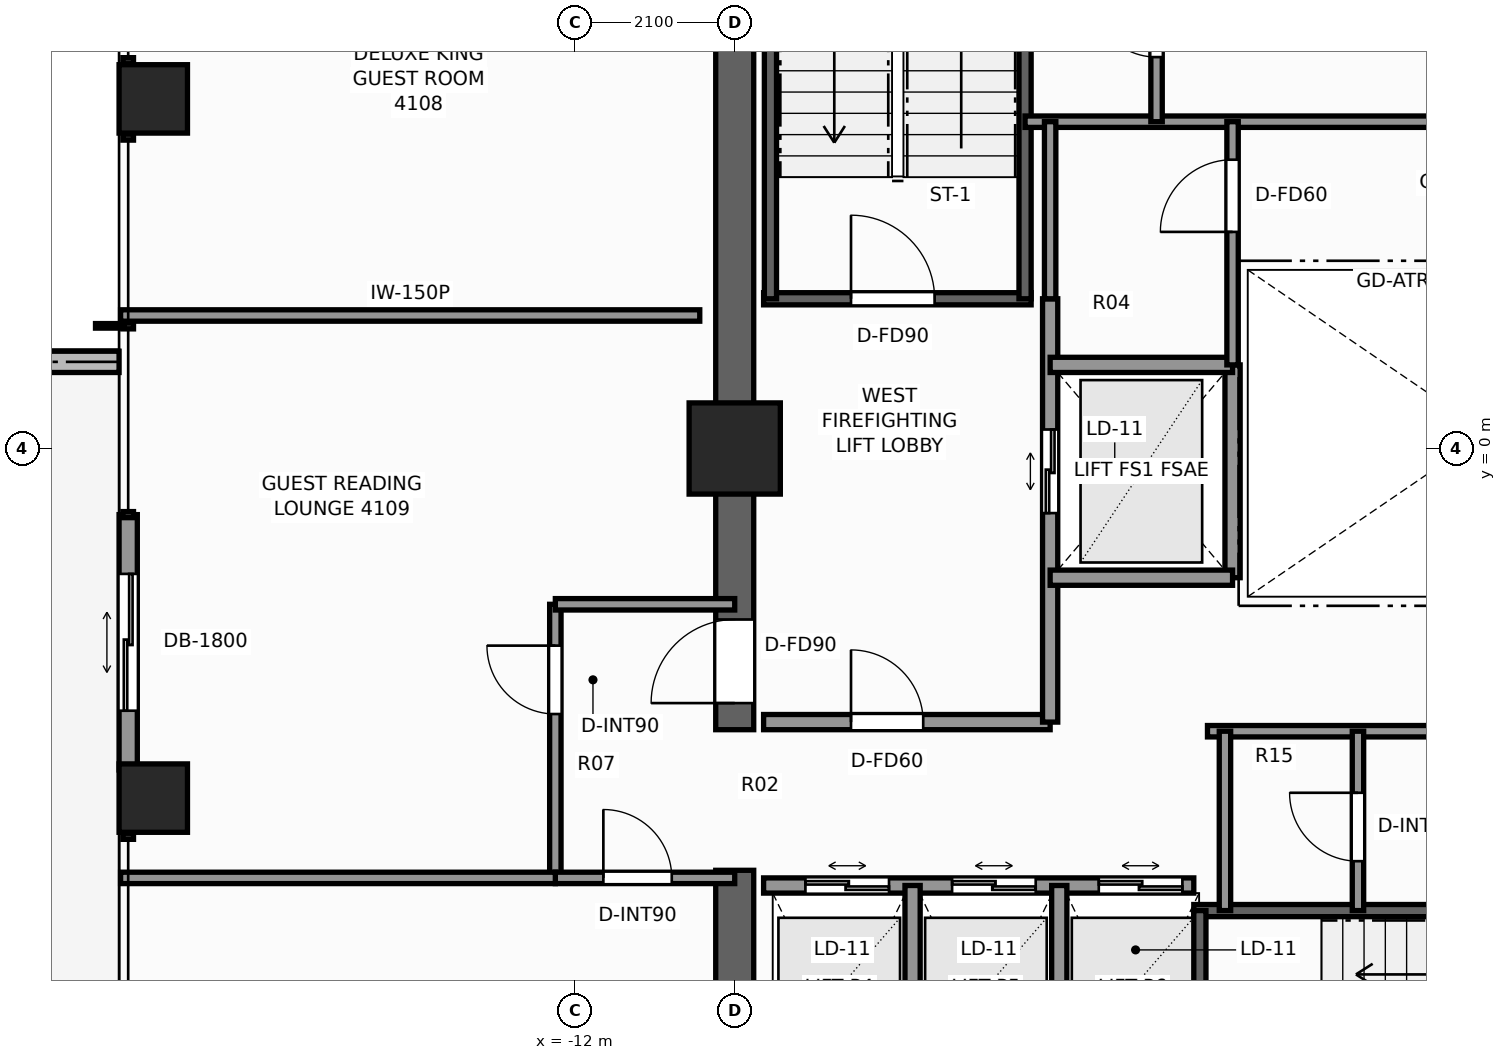
"""IFC4 building model, lengths in metres.
Left out: names, types, materials, properties, quantities, classifications, styles, units other than length and angle.
Written with IfcOpenShell. Run it as: python <this file> out.ifc"""

import sys

from ifc_helpers import new_model, si_unit, direction, frame, frame_2d, origin, origin_2d, place, context, subcontext, project, spatial, rectangle, extrude, element, fill, save


model = new_model("IFC4")
c1 = context("Model", 3, precision=1e-05, world=origin(), true_north=direction((0.0, 1.0)))
c2 = subcontext(c1, "Body", "Model", "MODEL_VIEW")
j1 = project(units=[si_unit("LENGTHUNIT", "METRE"), si_unit("PLANEANGLEUNIT", "RADIAN")], contexts=[c1])
p1 = place(None, origin())
s1 = spatial("IfcSite", under=j1, at=p1, CompositionType="ELEMENT")
p2 = place(p1, origin())
s2 = spatial("IfcBuilding", under=s1, at=p2, CompositionType="ELEMENT")
p3 = place(p2, frame((0.0, 0.0, 141.5)))
s3 = spatial("IfcBuildingStorey", under=s2, at=p3, CompositionType="ELEMENT", Elevation=141.5)
p4 = place(p3, frame((-9.9, -9.65, 0.0), z_axis=(0.0, 0.0, 1.0), x_axis=(0.0, 1.0, 0.0)))
e1 = element("IfcWall", 1, at=p4, inside=s3, PredefinedType="SHEAR", context=c2, shape_type="SweptSolid", body=[
    extrude(rectangle(XDim=4.1, YDim=0.5, at=frame_2d((2.05, 0.0))), origin(), (0.0, 0.0, 1.0), 3.3),
])
p5 = place(p3, frame((-9.9, -3.7, 0.0), z_axis=(0.0, 0.0, 1.0), x_axis=(0.0, 1.0, 0.0)))
e2 = element("IfcWall", 2, at=p5, inside=s3, PredefinedType="SHEAR", context=c2, shape_type="SweptSolid", body=[
    extrude(rectangle(XDim=13.35, YDim=0.5, at=frame_2d((6.675, 0.0))), origin(), (0.0, 0.0, 1.0), 3.3),
])
p6 = place(p5, frame((0.35, 0.0, 0.0)))
e3 = element("IfcOpeningElement", 3, at=p6, cuts=e2, PredefinedType="OPENING", context=c2, shape_type="SweptSolid", body=[
    extrude(rectangle(XDim=1.1, YDim=2.2, at=frame_2d((0.55, 1.1))), frame((0.0, 0.26, 0.0), z_axis=(0.0, -1.0, 0.0), x_axis=(1.0, 0.0, 0.0)), (0.0, 0.0, 1.0), 0.52),
])
p7 = place(p3, frame((-9.9, 0.0, 0.0), z_axis=(0.0, 0.0, 1.0), x_axis=(1.0, 0.0, 0.0)))
e4 = element("IfcColumn", 4, at=p7, inside=s3, PredefinedType="COLUMN", context=c2, shape_type="SweptSolid", body=[
    extrude(rectangle(XDim=1.2, YDim=1.2, at=origin_2d()), origin(), (0.0, 0.0, 1.0), 3.3),
])
for number, where, z_axis, x_axis in (
    (5, (-17.55, -4.6, 0.0), (0.0, 0.0, 1.0), (1.0, 0.0, 0.0)),
    (6, (-17.55, 4.6, 0.0), (0.0, 0.0, 1.0), (1.0, 0.0, 0.0)),
):
    element("IfcColumn", number, at=place(p3, frame(where, z_axis=z_axis, x_axis=x_axis)), inside=s3, PredefinedType="COLUMN", context=c2, shape_type="SweptSolid", body=[
        extrude(rectangle(XDim=0.9, YDim=0.9, at=origin_2d()), origin(), (0.0, 0.0, 1.0), 3.3),
    ])
p8 = place(p3, frame((-18.0, 1.14, -0.02), z_axis=(0.0, 0.0, 1.0), x_axis=(-1.0, 0.0, 0.0)))
e7 = element("IfcWall", 7, at=p8, inside=s3, PredefinedType="PARAPET", context=c2, shape_type="SweptSolid", body=[
    extrude(rectangle(XDim=3.3, YDim=0.28, at=frame_2d((1.65, 0.0))), origin(), (0.0, 0.0, 1.0), 0.42),
])
p9 = place(p3, frame((-17.88, -4.23, 0.0), z_axis=(0.0, 0.0, 1.0), x_axis=(0.0, 1.0, 0.0)))
e8 = element("IfcWall", 8, at=p9, inside=s3, PredefinedType="STANDARD", context=c2, shape_type="SweptSolid", body=[
    extrude(rectangle(XDim=3.36, YDim=0.24, at=frame_2d((1.68, 0.0))), origin(), (0.0, 0.0, 1.0), 3.1),
])
p10 = place(p9, frame((0.78, 0.0, 0.0)))
e9 = element("IfcOpeningElement", 9, at=p10, cuts=e8, PredefinedType="OPENING", context=c2, shape_type="SweptSolid", body=[
    extrude(rectangle(XDim=1.8, YDim=2.2, at=frame_2d((0.9, 1.1))), frame((0.0, 0.13, 0.0), z_axis=(0.0, -1.0, 0.0), x_axis=(1.0, 0.0, 0.0)), (0.0, 0.0, 1.0), 0.26),
])
p11 = place(p3, frame((-9.52, 1.97, 0.0), z_axis=(0.0, 0.0, 1.0), x_axis=(1.0, 0.0, 0.0)))
e10 = element("IfcWall", 10, at=p11, inside=s3, PredefinedType="SHEAR", context=c2, shape_type="SweptSolid", body=[
    extrude(rectangle(XDim=3.52, YDim=0.16, at=frame_2d((1.76, 0.0))), origin(), (0.0, 0.0, 1.0), 3.3),
])
p12 = place(p11, frame((1.15, 0.0, 0.0)))
e11 = element("IfcOpeningElement", 11, at=p12, cuts=e10, PredefinedType="OPENING", context=c2, shape_type="SweptSolid", body=[
    extrude(rectangle(XDim=1.1, YDim=2.2, at=frame_2d((0.55, 1.1))), frame((0.0, 0.09, 0.0), z_axis=(0.0, -1.0, 0.0), x_axis=(1.0, 0.0, 0.0)), (0.0, 0.0, 1.0), 0.18),
])
for number, where, z_axis, x_axis in (
    (12, (-9.43, 1.97, 0.0), (0.0, 0.0, 1.0), (0.0, 1.0, 0.0)),
    (13, (-6.08, 1.97, 0.0), (0.0, 0.0, 1.0), (0.0, 1.0, 0.0)),
):
    element("IfcWall", number, at=place(p3, frame(where, z_axis=z_axis, x_axis=x_axis)), inside=s3, PredefinedType="SHEAR", context=c2, shape_type="SweptSolid", body=[
        extrude(rectangle(XDim=7.56, YDim=0.16, at=frame_2d((3.78, 0.0))), origin(), (0.0, 0.0, 1.0), 3.3),
    ])
p13 = place(p3, frame((-3.86, -6.08, 0.0), z_axis=(0.0, 0.0, 1.0), x_axis=(1.0, 0.0, 0.0)))
e14 = element("IfcWall", 14, at=p13, inside=s3, PredefinedType="SHEAR", context=c2, shape_type="SweptSolid", body=[
    extrude(rectangle(XDim=7.72, YDim=0.16, at=frame_2d((3.86, 0.0))), origin(), (0.0, 0.0, 1.0), 3.3),
])
p14 = place(p3, frame((-3.78, -9.43, 0.0), z_axis=(0.0, 0.0, 1.0), x_axis=(0.0, 1.0, 0.0)))
e15 = element("IfcWall", 15, at=p14, inside=s3, PredefinedType="SHEAR", context=c2, shape_type="SweptSolid", body=[
    extrude(rectangle(XDim=3.35, YDim=0.16, at=frame_2d((1.675, 0.0))), origin(), (0.0, 0.0, 1.0), 3.3),
])
p15 = place(p3, frame((-9.52, -3.6, 0.0), z_axis=(0.0, 0.0, 1.0), x_axis=(1.0, 0.0, 0.0)))
e16 = element("IfcWall", 16, at=p15, inside=s3, PredefinedType="SOLIDWALL", context=c2, shape_type="SweptSolid", body=[
    extrude(rectangle(XDim=3.77, YDim=0.2, at=frame_2d((1.885, 0.0))), origin(), (0.0, 0.0, 1.0), 3.1),
])
p16 = place(p15, frame((1.15, 0.0, 0.0)))
e17 = element("IfcOpeningElement", 17, at=p16, cuts=e16, PredefinedType="OPENING", context=c2, shape_type="SweptSolid", body=[
    extrude(rectangle(XDim=0.95, YDim=2.06, at=frame_2d((0.475, 1.03))), frame((0.0, 0.11, 0.0), z_axis=(0.0, -1.0, 0.0), x_axis=(1.0, 0.0, 0.0)), (0.0, 0.0, 1.0), 0.22),
])
p17 = place(p3, frame((-5.75, -3.6, 0.0), z_axis=(0.0, 0.0, 1.0), x_axis=(0.0, 1.0, 0.0)))
e18 = element("IfcWall", 18, at=p17, inside=s3, PredefinedType="SOLIDWALL", context=c2, shape_type="SweptSolid", body=[
    extrude(rectangle(XDim=5.57, YDim=0.2, at=frame_2d((2.785, 0.0))), origin(), (0.0, 0.0, 1.0), 2.735),
])
p18 = place(p17, frame((2.75, 0.0, 0.0)))
e19 = element("IfcOpeningElement", 19, at=p18, cuts=e18, PredefinedType="OPENING", context=c2, shape_type="SweptSolid", body=[
    extrude(rectangle(XDim=1.1, YDim=2.2, at=frame_2d((0.55, 1.1))), frame((0.0, 0.11, 0.0), z_axis=(0.0, -1.0, 0.0), x_axis=(1.0, 0.0, 0.0)), (0.0, 0.0, 1.0), 0.22),
])
p19 = place(p3, frame((-3.35, -1.7, 0.0), z_axis=(0.0, 0.0, 1.0), x_axis=(0.0, 1.0, 0.0)))
e20 = element("IfcWall", 20, at=p19, inside=s3, PredefinedType="SOLIDWALL", context=c2, shape_type="SweptSolid", body=[
    extrude(rectangle(XDim=2.8, YDim=0.2, at=frame_2d((1.4, 0.0))), origin(), (0.0, 0.0, 1.0), 2.735),
])
for number, where, z_axis, x_axis in (
    (21, (-5.75, -1.7, 0.0), (0.0, 0.0, 1.0), (1.0, 0.0, 0.0)),
    (22, (-5.75, 1.1, 0.0), (0.0, 0.0, 1.0), (1.0, 0.0, 0.0)),
):
    element("IfcWall", number, at=place(p3, frame(where, z_axis=z_axis, x_axis=x_axis)), inside=s3, PredefinedType="SOLIDWALL", context=c2, shape_type="SweptSolid", body=[
        extrude(rectangle(XDim=2.4, YDim=0.2, at=frame_2d((1.2, 0.0))), origin(), (0.0, 0.0, 1.0), 3.1),
    ])
p20 = place(p3, frame((-6.08, 4.3, 0.0), z_axis=(0.0, 0.0, 1.0), x_axis=(1.0, 0.0, 0.0)))
e23 = element("IfcWall", 23, at=p20, inside=s3, PredefinedType="PARTITIONING", context=c2, shape_type="SweptSolid", body=[
    extrude(rectangle(XDim=6.3, YDim=0.15, at=frame_2d((3.15, 0.0))), origin(), (0.0, 0.0, 1.0), 3.1),
])
p21 = place(p3, frame((-4.35, 4.3, 0.0), z_axis=(0.0, 0.0, 1.0), x_axis=(0.0, 1.0, 0.0)))
e24 = element("IfcWall", 24, at=p21, inside=s3, PredefinedType="PARTITIONING", context=c2, shape_type="SweptSolid", body=[
    extrude(rectangle(XDim=5.22, YDim=0.15, at=frame_2d((2.61, 0.0))), origin(), (0.0, 0.0, 1.0), 3.1),
])
p22 = place(p21, frame((0.85, 0.0, 0.0)))
e25 = element("IfcOpeningElement", 25, at=p22, cuts=e24, PredefinedType="OPENING", context=c2, shape_type="SweptSolid", body=[
    extrude(rectangle(XDim=0.85, YDim=2.03, at=frame_2d((0.425, 1.015))), frame((0.0, 0.085, 0.0), z_axis=(0.0, -1.0, 0.0), x_axis=(1.0, 0.0, 0.0)), (0.0, 0.0, 1.0), 0.17),
])
p23 = place(p3, frame((-9.52, -5.75, 0.0), z_axis=(0.0, 0.0, 1.0), x_axis=(1.0, 0.0, 0.0)))
e26 = element("IfcWall", 26, at=p23, inside=s3, PredefinedType="SOLIDWALL", context=c2, shape_type="SweptSolid", body=[
    extrude(rectangle(XDim=5.66, YDim=0.2, at=frame_2d((2.83, 0.0))), origin(), (0.0, 0.0, 1.0), 3.1),
])
p24 = place(p23, frame((0.55, 0.0, 0.0)))
e27 = element("IfcOpeningElement", 27, at=p24, cuts=e26, PredefinedType="OPENING", context=c2, shape_type="SweptSolid", body=[
    extrude(rectangle(XDim=1.1, YDim=2.2, at=frame_2d((0.55, 1.1))), frame((0.0, 0.11, 0.0), z_axis=(0.0, -1.0, 0.0), x_axis=(1.0, 0.0, 0.0)), (0.0, 0.0, 1.0), 0.22),
])
p25 = place(p23, frame((2.48, 0.0, 0.0)))
e28 = element("IfcOpeningElement", 28, at=p25, cuts=e26, PredefinedType="OPENING", context=c2, shape_type="SweptSolid", body=[
    extrude(rectangle(XDim=1.1, YDim=2.2, at=frame_2d((0.55, 1.1))), frame((0.0, 0.11, 0.0), z_axis=(0.0, -1.0, 0.0), x_axis=(1.0, 0.0, 0.0)), (0.0, 0.0, 1.0), 0.22),
])
p26 = place(p23, frame((4.41, 0.0, 0.0)))
e29 = element("IfcOpeningElement", 29, at=p26, cuts=e26, PredefinedType="OPENING", context=c2, shape_type="SweptSolid", body=[
    extrude(rectangle(XDim=1.1, YDim=2.2, at=frame_2d((0.55, 1.1))), frame((0.0, 0.11, 0.0), z_axis=(0.0, -1.0, 0.0), x_axis=(1.0, 0.0, 0.0)), (0.0, 0.0, 1.0), 0.22),
])
for number, where, z_axis, x_axis in (
    (30, (-7.56, -9.52, 0.0), (0.0, 0.0, 1.0), (0.0, 1.0, 0.0)),
    (31, (-5.63, -9.52, 0.0), (0.0, 0.0, 1.0), (0.0, 1.0, 0.0)),
):
    element("IfcWall", number, at=place(p3, frame(where, z_axis=z_axis, x_axis=x_axis)), inside=s3, PredefinedType="SOLIDWALL", context=c2, shape_type="SweptSolid", body=[
        extrude(rectangle(XDim=3.77, YDim=0.2, at=frame_2d((1.885, 0.0))), origin(), (0.0, 0.0, 1.0), 3.1),
    ])
p27 = place(p3, frame((-3.68, -3.72, 0.0), z_axis=(0.0, 0.0, 1.0), x_axis=(1.0, 0.0, 0.0)))
e32 = element("IfcWall", 32, at=p27, inside=s3, PredefinedType="PARTITIONING", context=c2, shape_type="SweptSolid", body=[
    extrude(rectangle(XDim=7.36, YDim=0.15, at=frame_2d((3.68, 0.0))), origin(), (0.0, 0.0, 1.0), 3.1),
])
p28 = place(p3, frame((-3.45, -6.08, 0.0), z_axis=(0.0, 0.0, 1.0), x_axis=(0.0, 1.0, 0.0)))
e33 = element("IfcWall", 33, at=p28, inside=s3, PredefinedType="PARTITIONING", context=c2, shape_type="SweptSolid", body=[
    extrude(rectangle(XDim=2.36, YDim=0.15, at=frame_2d((1.18, 0.0))), origin(), (0.0, 0.0, 1.0), 3.1),
])
p29 = place(p3, frame((-1.7, -6.08, 0.0), z_axis=(0.0, 0.0, 1.0), x_axis=(0.0, 1.0, 0.0)))
e34 = element("IfcWall", 34, at=p29, inside=s3, PredefinedType="PARTITIONING", context=c2, shape_type="SweptSolid", body=[
    extrude(rectangle(XDim=2.36, YDim=0.15, at=frame_2d((1.18, 0.0))), origin(), (0.0, 0.0, 1.0), 3.1),
])
p30 = place(p29, frame((0.65, 0.0, 0.0)))
e35 = element("IfcOpeningElement", 35, at=p30, cuts=e34, PredefinedType="OPENING", context=c2, shape_type="SweptSolid", body=[
    extrude(rectangle(XDim=0.9, YDim=2.06, at=frame_2d((0.45, 1.03))), frame((0.0, 0.085, 0.0), z_axis=(0.0, -1.0, 0.0), x_axis=(1.0, 0.0, 0.0)), (0.0, 0.0, 1.0), 0.17),
])
p31 = place(p3, frame((-3.35, 1.1, 0.0), z_axis=(0.0, 0.0, 1.0), x_axis=(0.0, 1.0, 0.0)))
e36 = element("IfcWall", 36, at=p31, inside=s3, PredefinedType="PARTITIONING", context=c2, shape_type="SweptSolid", body=[
    extrude(rectangle(XDim=3.2, YDim=0.15, at=frame_2d((1.6, 0.0))), origin(), (0.0, 0.0, 1.0), 2.735),
])
p32 = place(p31, frame((1.75, 0.0, 0.0)))
e37 = element("IfcOpeningElement", 37, at=p32, cuts=e36, PredefinedType="OPENING", context=c2, shape_type="SweptSolid", body=[
    extrude(rectangle(XDim=0.95, YDim=2.06, at=frame_2d((0.475, 1.03))), frame((0.0, 0.085, 0.0), z_axis=(0.0, -1.0, 0.0), x_axis=(1.0, 0.0, 0.0)), (0.0, 0.0, 1.0), 0.17),
])
p33 = place(p3, frame((-5.75, 1.97, 0.0), z_axis=(0.0, 0.0, 1.0), x_axis=(0.0, 1.0, 0.0)))
e38 = element("IfcWall", 38, at=p33, inside=s3, PredefinedType="PARTITIONING", context=c2, shape_type="SweptSolid", body=[
    extrude(rectangle(XDim=2.33, YDim=0.15, at=frame_2d((1.165, 0.0))), origin(), (0.0, 0.0, 1.0), 2.735),
])
p34 = place(p3, frame((-12.26, -5.65, 0.0), z_axis=(0.0, 0.0, 1.0), x_axis=(0.0, 1.0, 0.0)))
e39 = element("IfcWall", 39, at=p34, inside=s3, PredefinedType="PARTITIONING", context=c2, shape_type="SweptSolid", body=[
    extrude(rectangle(XDim=3.6, YDim=0.15, at=frame_2d((1.8, 0.0))), origin(), (0.0, 0.0, 1.0), 2.312),
])
p35 = place(p34, frame((2.156, 0.0, 0.0)))
e40 = element("IfcOpeningElement", 40, at=p35, cuts=e39, PredefinedType="OPENING", context=c2, shape_type="SweptSolid", body=[
    extrude(rectangle(XDim=0.9, YDim=2.06, at=frame_2d((0.45, 1.03))), frame((0.0, 0.085, 0.0), z_axis=(0.0, -1.0, 0.0), x_axis=(1.0, 0.0, 0.0)), (0.0, 0.0, 1.0), 0.17),
])
p36 = place(p3, frame((-12.26, -2.05, 0.0), z_axis=(0.0, 0.0, 1.0), x_axis=(1.0, 0.0, 0.0)))
e41 = element("IfcWall", 41, at=p36, inside=s3, PredefinedType="PARTITIONING", context=c2, shape_type="SweptSolid", body=[
    extrude(rectangle(XDim=2.36, YDim=0.15, at=frame_2d((1.18, 0.0))), origin(), (0.0, 0.0, 1.0), 3.1),
])
p37 = place(p3, frame((-12.26, -5.65, 0.0), z_axis=(0.0, 0.0, 1.0), x_axis=(1.0, 0.0, 0.0)))
e42 = element("IfcWall", 42, at=p37, inside=s3, PredefinedType="PARTITIONING", context=c2, shape_type="SweptSolid", body=[
    extrude(rectangle(XDim=2.36, YDim=0.15, at=frame_2d((1.18, 0.0))), origin(), (0.0, 0.0, 1.0), 3.1),
])
p38 = place(p37, frame((0.632, 0.0, 0.0)))
e43 = element("IfcOpeningElement", 43, at=p38, cuts=e42, PredefinedType="OPENING", context=c2, shape_type="SweptSolid", body=[
    extrude(rectangle(XDim=0.9, YDim=2.06, at=frame_2d((0.45, 1.03))), frame((0.0, 0.085, 0.0), z_axis=(0.0, -1.0, 0.0), x_axis=(1.0, 0.0, 0.0)), (0.0, 0.0, 1.0), 0.17),
])
p39 = place(p3, frame((-17.98, 1.75, 0.0), z_axis=(0.0, 0.0, 1.0), x_axis=(1.0, 0.0, 0.0)))
e44 = element("IfcWall", 44, at=p39, inside=s3, PredefinedType="PARTITIONING", context=c2, shape_type="SweptSolid", body=[
    extrude(rectangle(XDim=7.62, YDim=0.15, at=frame_2d((3.81, 0.0))), origin(), (0.0, 0.0, 1.0), 2.469),
])
p40 = place(p3, frame((-17.98, -5.65, 0.0), z_axis=(0.0, 0.0, 1.0), x_axis=(1.0, 0.0, 0.0)))
e45 = element("IfcWall", 45, at=p40, inside=s3, PredefinedType="PARTITIONING", context=c2, shape_type="SweptSolid", body=[
    extrude(rectangle(XDim=5.72, YDim=0.15, at=frame_2d((2.86, 0.0))), origin(), (0.0, 0.0, 1.0), 2.469),
])
p41 = place(p10, origin())
e46 = element("IfcDoor", 46, at=p41, inside=s3, OperationType="DOUBLE_DOOR_SLIDING", PredefinedType="DOOR", context=c2, shape_type="SweptSolid", body=[
    extrude(rectangle(XDim=1.8, YDim=2.2, at=frame_2d((0.9, 1.1))), frame((0.0, 0.025, 0.0), z_axis=(0.0, -1.0, 0.0), x_axis=(1.0, 0.0, 0.0)), (0.0, 0.0, 1.0), 0.05),
])
fill(e9, e46)
p42 = place(p12, origin())
e47 = element("IfcDoor", 47, at=p42, inside=s3, OperationType="SINGLE_SWING_LEFT", PredefinedType="DOOR", context=c2, shape_type="SweptSolid", body=[
    extrude(rectangle(XDim=1.1, YDim=2.2, at=frame_2d((0.55, 1.1))), frame((0.0, 0.025, 0.0), z_axis=(0.0, -1.0, 0.0), x_axis=(1.0, 0.0, 0.0)), (0.0, 0.0, 1.0), 0.05),
])
fill(e11, e47)
p43 = place(p6, origin())
e48 = element("IfcDoor", 48, at=p43, inside=s3, OperationType="SINGLE_SWING_LEFT", PredefinedType="DOOR", context=c2, shape_type="SweptSolid", body=[
    extrude(rectangle(XDim=1.1, YDim=2.2, at=frame_2d((0.55, 1.1))), frame((0.0, 0.025, 0.0), z_axis=(0.0, -1.0, 0.0), x_axis=(1.0, 0.0, 0.0)), (0.0, 0.0, 1.0), 0.05),
])
fill(e3, e48)
p44 = place(p18, origin())
e49 = element("IfcDoor", 49, at=p44, inside=s3, OperationType="DOUBLE_DOOR_SLIDING", PredefinedType="DOOR", context=c2, shape_type="SweptSolid", body=[
    extrude(rectangle(XDim=1.1, YDim=2.2, at=frame_2d((0.55, 1.1))), frame((0.0, 0.025, 0.0), z_axis=(0.0, -1.0, 0.0), x_axis=(1.0, 0.0, 0.0)), (0.0, 0.0, 1.0), 0.05),
])
fill(e19, e49)
p45 = place(p22, origin())
e50 = element("IfcDoor", 50, at=p45, inside=s3, OperationType="SINGLE_SWING_RIGHT", PredefinedType="DOOR", context=c2, shape_type="SweptSolid", body=[
    extrude(rectangle(XDim=0.85, YDim=2.03, at=frame_2d((0.425, 1.015))), frame((0.0, 0.025, 0.0), z_axis=(0.0, -1.0, 0.0), x_axis=(1.0, 0.0, 0.0)), (0.0, 0.0, 1.0), 0.05),
])
fill(e25, e50)
p46 = place(p24, origin())
e51 = element("IfcDoor", 51, at=p46, inside=s3, OperationType="DOUBLE_DOOR_SLIDING", PredefinedType="DOOR", context=c2, shape_type="SweptSolid", body=[
    extrude(rectangle(XDim=1.1, YDim=2.2, at=frame_2d((0.55, 1.1))), frame((0.0, 0.025, 0.0), z_axis=(0.0, -1.0, 0.0), x_axis=(1.0, 0.0, 0.0)), (0.0, 0.0, 1.0), 0.05),
])
fill(e27, e51)
p47 = place(p25, origin())
e52 = element("IfcDoor", 52, at=p47, inside=s3, OperationType="DOUBLE_DOOR_SLIDING", PredefinedType="DOOR", context=c2, shape_type="SweptSolid", body=[
    extrude(rectangle(XDim=1.1, YDim=2.2, at=frame_2d((0.55, 1.1))), frame((0.0, 0.025, 0.0), z_axis=(0.0, -1.0, 0.0), x_axis=(1.0, 0.0, 0.0)), (0.0, 0.0, 1.0), 0.05),
])
fill(e28, e52)
p48 = place(p26, origin())
e53 = element("IfcDoor", 53, at=p48, inside=s3, OperationType="DOUBLE_DOOR_SLIDING", PredefinedType="DOOR", context=c2, shape_type="SweptSolid", body=[
    extrude(rectangle(XDim=1.1, YDim=2.2, at=frame_2d((0.55, 1.1))), frame((0.0, 0.025, 0.0), z_axis=(0.0, -1.0, 0.0), x_axis=(1.0, 0.0, 0.0)), (0.0, 0.0, 1.0), 0.05),
])
fill(e29, e53)
p49 = place(p16, origin())
e54 = element("IfcDoor", 54, at=p49, inside=s3, OperationType="SINGLE_SWING_LEFT", PredefinedType="DOOR", context=c2, shape_type="SweptSolid", body=[
    extrude(rectangle(XDim=0.95, YDim=2.06, at=frame_2d((0.475, 1.03))), frame((0.0, 0.025, 0.0), z_axis=(0.0, -1.0, 0.0), x_axis=(1.0, 0.0, 0.0)), (0.0, 0.0, 1.0), 0.05),
])
fill(e17, e54)
p50 = place(p30, origin())
e55 = element("IfcDoor", 55, at=p50, inside=s3, OperationType="SINGLE_SWING_RIGHT", PredefinedType="DOOR", context=c2, shape_type="SweptSolid", body=[
    extrude(rectangle(XDim=0.9, YDim=2.06, at=frame_2d((0.45, 1.03))), frame((0.0, 0.025, 0.0), z_axis=(0.0, -1.0, 0.0), x_axis=(1.0, 0.0, 0.0)), (0.0, 0.0, 1.0), 0.05),
])
fill(e35, e55)
p51 = place(p32, origin())
e56 = element("IfcDoor", 56, at=p51, inside=s3, OperationType="SINGLE_SWING_LEFT", PredefinedType="DOOR", context=c2, shape_type="SweptSolid", body=[
    extrude(rectangle(XDim=0.95, YDim=2.06, at=frame_2d((0.475, 1.03))), frame((0.0, 0.025, 0.0), z_axis=(0.0, -1.0, 0.0), x_axis=(1.0, 0.0, 0.0)), (0.0, 0.0, 1.0), 0.05),
])
fill(e37, e56)
p52 = place(p35, origin())
e57 = element("IfcDoor", 57, at=p52, inside=s3, OperationType="SINGLE_SWING_RIGHT", PredefinedType="DOOR", context=c2, shape_type="SweptSolid", body=[
    extrude(rectangle(XDim=0.9, YDim=2.06, at=frame_2d((0.45, 1.03))), frame((0.0, 0.025, 0.0), z_axis=(0.0, -1.0, 0.0), x_axis=(1.0, 0.0, 0.0)), (0.0, 0.0, 1.0), 0.05),
])
fill(e40, e57)
p53 = place(p38, origin())
e58 = element("IfcDoor", 58, at=p53, inside=s3, OperationType="SINGLE_SWING_LEFT", PredefinedType="DOOR", context=c2, shape_type="SweptSolid", body=[
    extrude(rectangle(XDim=0.9, YDim=2.06, at=frame_2d((0.45, 1.03))), frame((0.0, 0.025, 0.0), z_axis=(0.0, -1.0, 0.0), x_axis=(1.0, 0.0, 0.0)), (0.0, 0.0, 1.0), 0.05),
])
fill(e43, e58)
save(model, sys.argv[1])
